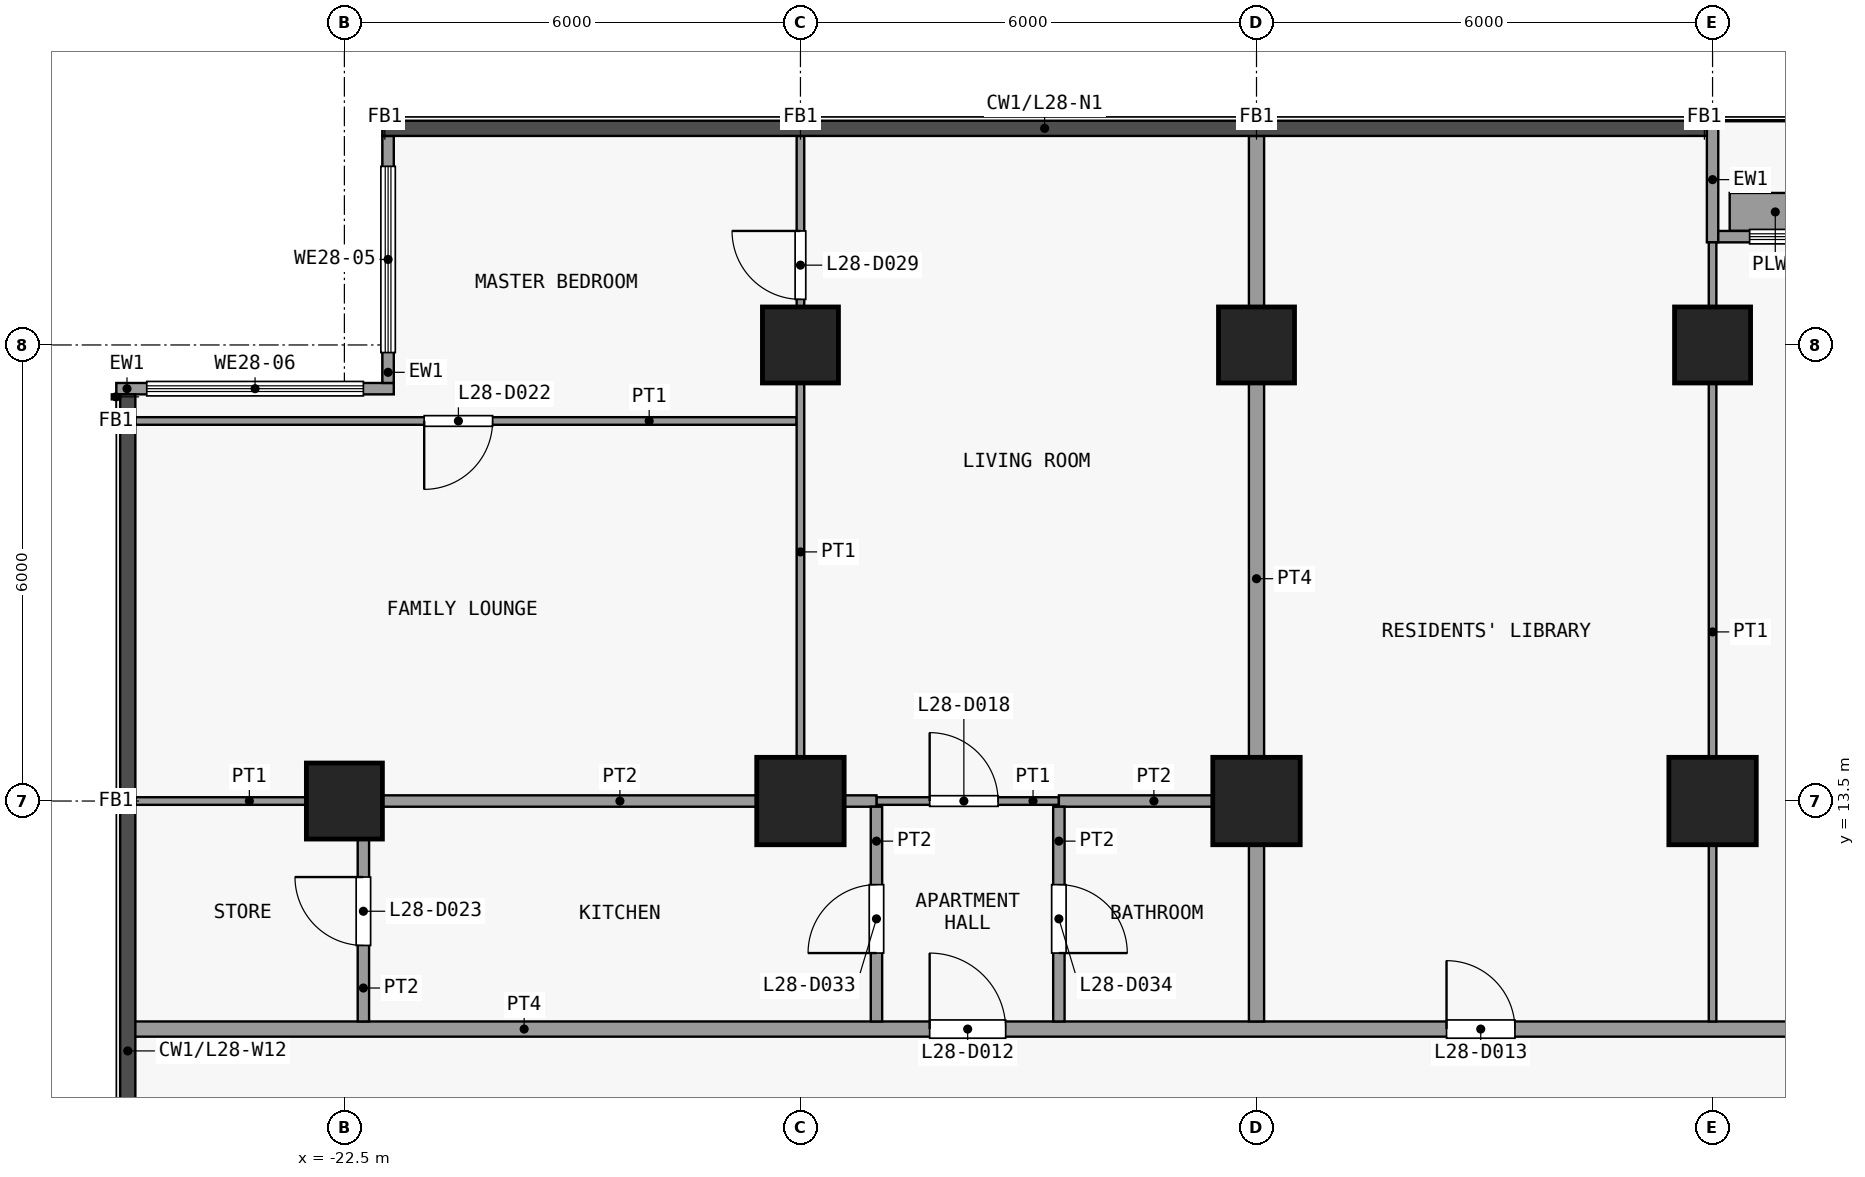
"""IFC4 building model, lengths in metres.
Left out: names, types, materials, properties, quantities, classifications, styles, units other than length and angle.
Written with IfcOpenShell. Run it as: python <this file> out.ifc"""

import sys

from ifc_helpers import new_model, si_unit, direction, frame, frame_2d, origin, origin_2d, place, context, subcontext, project, spatial, rectangle, extrude, element, fill, save


model = new_model("IFC4")
c1 = context("Model", 3, precision=1e-05, world=origin(), true_north=direction((0.0, 1.0)))
c2 = subcontext(c1, "Body", "Model", "MODEL_VIEW")
j1 = project(units=[si_unit("LENGTHUNIT", "METRE"), si_unit("PLANEANGLEUNIT", "RADIAN")], contexts=[c1])
p1 = place(None, origin())
s1 = spatial("IfcSite", under=j1, at=p1, CompositionType="ELEMENT")
p2 = place(p1, origin())
s2 = spatial("IfcBuilding", under=s1, at=p2, CompositionType="ELEMENT")
p3 = place(p2, frame((0.0, 0.0, 113.5)))
s3 = spatial("IfcBuildingStorey", under=s2, at=p3, CompositionType="ELEMENT", Elevation=113.5)
p4 = place(p3, frame((-22.5, 13.5, 0.0), z_axis=(0.0, 0.0, 1.0), x_axis=(1.0, 0.0, 0.0)))
e1 = element("IfcColumn", 1, at=p4, inside=s3, PredefinedType="COLUMN", context=c2, shape_type="SweptSolid", body=[
    extrude(rectangle(XDim=1.0, YDim=1.0, at=origin_2d()), origin(), (0.0, 0.0, 1.0), 3.6),
])
p5 = place(p3, frame((-16.5, 13.5, 0.0), z_axis=(0.0, 0.0, 1.0), x_axis=(1.0, 0.0, 0.0)))
e2 = element("IfcColumn", 2, at=p5, inside=s3, PredefinedType="COLUMN", context=c2, shape_type="SweptSolid", body=[
    extrude(rectangle(XDim=1.15, YDim=1.15, at=origin_2d()), origin(), (0.0, 0.0, 1.0), 3.6),
])
p6 = place(p3, frame((-16.5, 19.5, 0.0), z_axis=(0.0, 0.0, 1.0), x_axis=(1.0, 0.0, 0.0)))
e3 = element("IfcColumn", 3, at=p6, inside=s3, PredefinedType="COLUMN", context=c2, shape_type="SweptSolid", body=[
    extrude(rectangle(XDim=1.0, YDim=1.0, at=origin_2d()), origin(), (0.0, 0.0, 1.0), 3.6),
])
p7 = place(p3, frame((-10.5, 13.5, 0.0), z_axis=(0.0, 0.0, 1.0), x_axis=(1.0, 0.0, 0.0)))
e4 = element("IfcColumn", 4, at=p7, inside=s3, PredefinedType="COLUMN", context=c2, shape_type="SweptSolid", body=[
    extrude(rectangle(XDim=1.15, YDim=1.15, at=origin_2d()), origin(), (0.0, 0.0, 1.0), 3.6),
])
p8 = place(p3, frame((-10.5, 19.5, 0.0), z_axis=(0.0, 0.0, 1.0), x_axis=(1.0, 0.0, 0.0)))
e5 = element("IfcColumn", 5, at=p8, inside=s3, PredefinedType="COLUMN", context=c2, shape_type="SweptSolid", body=[
    extrude(rectangle(XDim=1.0, YDim=1.0, at=origin_2d()), origin(), (0.0, 0.0, 1.0), 3.6),
])
p9 = place(p3, frame((-4.5, 13.5, 0.0), z_axis=(0.0, 0.0, 1.0), x_axis=(1.0, 0.0, 0.0)))
e6 = element("IfcColumn", 6, at=p9, inside=s3, PredefinedType="COLUMN", context=c2, shape_type="SweptSolid", body=[
    extrude(rectangle(XDim=1.15, YDim=1.15, at=origin_2d()), origin(), (0.0, 0.0, 1.0), 3.6),
])
p10 = place(p3, frame((-4.5, 19.5, 0.0), z_axis=(0.0, 0.0, 1.0), x_axis=(1.0, 0.0, 0.0)))
e7 = element("IfcColumn", 7, at=p10, inside=s3, PredefinedType="COLUMN", context=c2, shape_type="SweptSolid", body=[
    extrude(rectangle(XDim=1.0, YDim=1.0, at=origin_2d()), origin(), (0.0, 0.0, 1.0), 3.6),
])
p11 = place(p3, frame((-21.925, 19.0, 0.0), z_axis=(0.0, 0.0, 1.0), x_axis=(0.0, 1.0, 0.0)))
e8 = element("IfcWall", 8, at=p11, inside=s3, PredefinedType="SOLIDWALL", context=c2, shape_type="SweptSolid", body=[
    extrude(rectangle(XDim=3.25, YDim=0.15, at=frame_2d((1.625, 0.0))), origin(), (0.0, 0.0, 1.0), 3.3),
])
p12 = place(p11, frame((0.4, 0.0, 0.9)))
e9 = element("IfcOpeningElement", 9, at=p12, cuts=e8, PredefinedType="OPENING", context=c2, shape_type="SweptSolid", body=[
    extrude(rectangle(XDim=2.45, YDim=2.4, at=frame_2d((1.225, 1.2))), frame((0.0, 0.085, 0.0), z_axis=(0.0, -1.0, 0.0), x_axis=(1.0, 0.0, 0.0)), (0.0, 0.0, 1.0), 0.17),
])
p13 = place(p3, frame((-25.5, 18.925, 0.0), z_axis=(0.0, 0.0, 1.0), x_axis=(1.0, 0.0, 0.0)))
e10 = element("IfcWall", 10, at=p13, inside=s3, PredefinedType="SOLIDWALL", context=c2, shape_type="SweptSolid", body=[
    extrude(rectangle(XDim=3.65, YDim=0.15, at=frame_2d((1.825, 0.0))), origin(), (0.0, 0.0, 1.0), 3.3),
])
p14 = place(p13, frame((0.4, 0.0, 0.9)))
e11 = element("IfcOpeningElement", 11, at=p14, cuts=e10, PredefinedType="OPENING", context=c2, shape_type="SweptSolid", body=[
    extrude(rectangle(XDim=2.85, YDim=2.4, at=frame_2d((1.425, 1.2))), frame((0.0, 0.085, 0.0), z_axis=(0.0, -1.0, 0.0), x_axis=(1.0, 0.0, 0.0)), (0.0, 0.0, 1.0), 0.17),
])
p15 = place(p3, frame((-4.5, 20.85, 0.0), z_axis=(0.0, 0.0, 1.0), x_axis=(0.0, 1.0, 0.0)))
e12 = element("IfcWall", 12, at=p15, inside=s3, PredefinedType="SOLIDWALL", context=c2, shape_type="SweptSolid", body=[
    extrude(rectangle(XDim=1.65, YDim=0.15, at=frame_2d((0.825, 0.0))), origin(), (0.0, 0.0, 1.0), 3.3),
])
p16 = place(p3, frame((-4.425, 20.925, 0.0), z_axis=(0.0, 0.0, 1.0), x_axis=(1.0, 0.0, 0.0)))
e13 = element("IfcWall", 13, at=p16, inside=s3, PredefinedType="SOLIDWALL", context=c2, shape_type="SweptSolid", body=[
    extrude(rectangle(XDim=8.85, YDim=0.15, at=frame_2d((4.425, 0.0))), origin(), (0.0, 0.0, 1.0), 3.3),
])
p17 = place(p16, frame((3.825, 0.0, 0.0)))
e14 = element("IfcOpeningElement", 14, at=p17, cuts=e13, PredefinedType="OPENING", context=c2, shape_type="SweptSolid", body=[
    extrude(rectangle(XDim=1.2, YDim=2.4, at=frame_2d((0.6, 1.2))), frame((0.0, 0.085, 0.0), z_axis=(0.0, -1.0, 0.0), x_axis=(1.0, 0.0, 0.0)), (0.0, 0.0, 1.0), 0.17),
])
p18 = place(p16, frame((0.413, 0.0, 0.9)))
e15 = element("IfcOpeningElement", 15, at=p18, cuts=e13, PredefinedType="OPENING", context=c2, shape_type="SweptSolid", body=[
    extrude(rectangle(XDim=3.0, YDim=2.1, at=frame_2d((1.5, 1.05))), frame((0.0, 0.085, 0.0), z_axis=(0.0, -1.0, 0.0), x_axis=(1.0, 0.0, 0.0)), (0.0, 0.0, 1.0), 0.17),
])
p19 = place(p16, frame((5.438, 0.0, 0.9)))
e16 = element("IfcOpeningElement", 16, at=p19, cuts=e13, PredefinedType="OPENING", context=c2, shape_type="SweptSolid", body=[
    extrude(rectangle(XDim=3.0, YDim=2.1, at=frame_2d((1.5, 1.05))), frame((0.0, 0.085, 0.0), z_axis=(0.0, -1.0, 0.0), x_axis=(1.0, 0.0, 0.0)), (0.0, 0.0, 1.0), 0.17),
])
p20 = place(p3, frame((-4.275, 21.25, 0.0), z_axis=(0.0, 0.0, 1.0), x_axis=(1.0, 0.0, 0.0)))
e17 = element("IfcWall", 17, at=p20, inside=s3, PredefinedType="USERDEFINED", context=c2, shape_type="SweptSolid", body=[
    extrude(rectangle(XDim=1.2, YDim=0.5, at=frame_2d((0.6, 0.0))), origin(), (0.0, 0.0, 1.0), 0.9),
])
p21 = place(p3, frame((-25.35, 10.5, 0.0), z_axis=(0.0, 0.0, 1.0), x_axis=(1.0, 0.0, 0.0)))
e18 = element("IfcWall", 18, at=p21, inside=s3, PredefinedType="PARTITIONING", context=c2, shape_type="SweptSolid", body=[
    extrude(rectangle(XDim=49.2, YDim=0.2, at=frame_2d((24.6, 0.0))), origin(), (0.0, 0.0, 1.0), 3.3),
])
p22 = place(p21, frame((10.55, 0.0, 0.0)))
e19 = element("IfcOpeningElement", 19, at=p22, cuts=e18, PredefinedType="OPENING", context=c2, shape_type="SweptSolid", body=[
    extrude(rectangle(XDim=1.0, YDim=2.1, at=frame_2d((0.5, 1.05))), frame((0.0, 0.11, 0.0), z_axis=(0.0, -1.0, 0.0), x_axis=(1.0, 0.0, 0.0)), (0.0, 0.0, 1.0), 0.22),
])
p23 = place(p21, frame((17.35, 0.0, 0.0)))
e20 = element("IfcOpeningElement", 20, at=p23, cuts=e18, PredefinedType="OPENING", context=c2, shape_type="SweptSolid", body=[
    extrude(rectangle(XDim=0.9, YDim=2.1, at=frame_2d((0.45, 1.05))), frame((0.0, 0.11, 0.0), z_axis=(0.0, -1.0, 0.0), x_axis=(1.0, 0.0, 0.0)), (0.0, 0.0, 1.0), 0.22),
])
p24 = place(p21, frame((24.85, 0.0, 0.0)))
e21 = element("IfcOpeningElement", 21, at=p24, cuts=e18, PredefinedType="OPENING", context=c2, shape_type="SweptSolid", body=[
    extrude(rectangle(XDim=0.9, YDim=2.1, at=frame_2d((0.45, 1.05))), frame((0.0, 0.11, 0.0), z_axis=(0.0, -1.0, 0.0), x_axis=(1.0, 0.0, 0.0)), (0.0, 0.0, 1.0), 0.22),
])
p25 = place(p21, frame((32.35, 0.0, 0.0)))
e22 = element("IfcOpeningElement", 22, at=p25, cuts=e18, PredefinedType="OPENING", context=c2, shape_type="SweptSolid", body=[
    extrude(rectangle(XDim=0.9, YDim=2.1, at=frame_2d((0.45, 1.05))), frame((0.0, 0.11, 0.0), z_axis=(0.0, -1.0, 0.0), x_axis=(1.0, 0.0, 0.0)), (0.0, 0.0, 1.0), 0.22),
])
p26 = place(p21, frame((36.55, 0.0, 0.0)))
e23 = element("IfcOpeningElement", 23, at=p26, cuts=e18, PredefinedType="OPENING", context=c2, shape_type="SweptSolid", body=[
    extrude(rectangle(XDim=1.0, YDim=2.1, at=frame_2d((0.5, 1.05))), frame((0.0, 0.11, 0.0), z_axis=(0.0, -1.0, 0.0), x_axis=(1.0, 0.0, 0.0)), (0.0, 0.0, 1.0), 0.22),
])
p27 = place(p21, frame((45.05, 0.0, 0.0)))
e24 = element("IfcOpeningElement", 24, at=p27, cuts=e18, PredefinedType="OPENING", context=c2, shape_type="SweptSolid", body=[
    extrude(rectangle(XDim=1.0, YDim=2.1, at=frame_2d((0.5, 1.05))), frame((0.0, 0.11, 0.0), z_axis=(0.0, -1.0, 0.0), x_axis=(1.0, 0.0, 0.0)), (0.0, 0.0, 1.0), 0.22),
])
p28 = place(p3, frame((-25.25, 13.5, 0.0), z_axis=(0.0, 0.0, 1.0), x_axis=(1.0, 0.0, 0.0)))
e25 = element("IfcWall", 25, at=p28, inside=s3, PredefinedType="PARTITIONING", context=c2, shape_type="SweptSolid", body=[
    extrude(rectangle(XDim=3.0, YDim=0.1, at=frame_2d((1.5, 0.0))), origin(), (0.0, 0.0, 1.0), 3.3),
])
p29 = place(p3, frame((-15.5, 13.5, 0.0), z_axis=(0.0, 0.0, 1.0), x_axis=(1.0, 0.0, 0.0)))
e26 = element("IfcWall", 26, at=p29, inside=s3, PredefinedType="PARTITIONING", context=c2, shape_type="SweptSolid", body=[
    extrude(rectangle(XDim=2.4, YDim=0.1, at=frame_2d((1.2, 0.0))), origin(), (0.0, 0.0, 1.0), 3.3),
])
p30 = place(p29, frame((0.7, 0.0, 0.0)))
e27 = element("IfcOpeningElement", 27, at=p30, cuts=e26, PredefinedType="OPENING", context=c2, shape_type="SweptSolid", body=[
    extrude(rectangle(XDim=0.9, YDim=2.1, at=frame_2d((0.45, 1.05))), frame((0.0, 0.06, 0.0), z_axis=(0.0, -1.0, 0.0), x_axis=(1.0, 0.0, 0.0)), (0.0, 0.0, 1.0), 0.12),
])
p31 = place(p3, frame((-22.25, 13.5, 0.0), z_axis=(0.0, 0.0, 1.0), x_axis=(1.0, 0.0, 0.0)))
e28 = element("IfcWall", 28, at=p31, inside=s3, PredefinedType="PARTITIONING", context=c2, shape_type="SweptSolid", body=[
    extrude(rectangle(XDim=6.75, YDim=0.15, at=frame_2d((3.375, 0.0))), origin(), (0.0, 0.0, 1.0), 3.3),
])
p32 = place(p3, frame((-13.1, 13.5, 0.0), z_axis=(0.0, 0.0, 1.0), x_axis=(1.0, 0.0, 0.0)))
e29 = element("IfcWall", 29, at=p32, inside=s3, PredefinedType="PARTITIONING", context=c2, shape_type="SweptSolid", body=[
    extrude(rectangle(XDim=2.5, YDim=0.15, at=frame_2d((1.25, 0.0))), origin(), (0.0, 0.0, 1.0), 3.3),
])
p33 = place(p3, frame((-25.25, 18.5, 0.0), z_axis=(0.0, 0.0, 1.0), x_axis=(1.0, 0.0, 0.0)))
e30 = element("IfcWall", 30, at=p33, inside=s3, PredefinedType="PARTITIONING", context=c2, shape_type="SweptSolid", body=[
    extrude(rectangle(XDim=8.7, YDim=0.1, at=frame_2d((4.35, 0.0))), origin(), (0.0, 0.0, 1.0), 3.3),
])
p34 = place(p33, frame((3.8, 0.0, 0.0)))
e31 = element("IfcOpeningElement", 31, at=p34, cuts=e30, PredefinedType="OPENING", context=c2, shape_type="SweptSolid", body=[
    extrude(rectangle(XDim=0.9, YDim=2.1, at=frame_2d((0.45, 1.05))), frame((0.0, 0.06, 0.0), z_axis=(0.0, -1.0, 0.0), x_axis=(1.0, 0.0, 0.0)), (0.0, 0.0, 1.0), 0.12),
])
p35 = place(p3, frame((-22.25, 10.6, 0.0), z_axis=(0.0, 0.0, 1.0), x_axis=(0.0, 1.0, 0.0)))
e32 = element("IfcWall", 32, at=p35, inside=s3, PredefinedType="PARTITIONING", context=c2, shape_type="SweptSolid", body=[
    extrude(rectangle(XDim=2.825, YDim=0.15, at=frame_2d((1.413, 0.0))), origin(), (0.0, 0.0, 1.0), 3.3),
])
p36 = place(p35, frame((1.0, 0.0, 0.0)))
e33 = element("IfcOpeningElement", 33, at=p36, cuts=e32, PredefinedType="OPENING", context=c2, shape_type="SweptSolid", body=[
    extrude(rectangle(XDim=0.9, YDim=2.1, at=frame_2d((0.45, 1.05))), frame((0.0, 0.085, 0.0), z_axis=(0.0, -1.0, 0.0), x_axis=(1.0, 0.0, 0.0)), (0.0, 0.0, 1.0), 0.17),
])
p37 = place(p3, frame((-16.5, 13.575, 0.0), z_axis=(0.0, 0.0, 1.0), x_axis=(0.0, 1.0, 0.0)))
e34 = element("IfcWall", 34, at=p37, inside=s3, PredefinedType="PARTITIONING", context=c2, shape_type="SweptSolid", body=[
    extrude(rectangle(XDim=8.675, YDim=0.1, at=frame_2d((4.337, 0.0))), origin(), (0.0, 0.0, 1.0), 3.3),
])
p38 = place(p37, frame((6.525, 0.0, 0.0)))
e35 = element("IfcOpeningElement", 35, at=p38, cuts=e34, PredefinedType="OPENING", context=c2, shape_type="SweptSolid", body=[
    extrude(rectangle(XDim=0.9, YDim=2.1, at=frame_2d((0.45, 1.05))), frame((0.0, 0.06, 0.0), z_axis=(0.0, -1.0, 0.0), x_axis=(1.0, 0.0, 0.0)), (0.0, 0.0, 1.0), 0.12),
])
p39 = place(p3, frame((-15.5, 10.6, 0.0), z_axis=(0.0, 0.0, 1.0), x_axis=(0.0, 1.0, 0.0)))
e36 = element("IfcWall", 36, at=p39, inside=s3, PredefinedType="PARTITIONING", context=c2, shape_type="SweptSolid", body=[
    extrude(rectangle(XDim=2.825, YDim=0.15, at=frame_2d((1.413, 0.0))), origin(), (0.0, 0.0, 1.0), 3.3),
])
p40 = place(p39, frame((0.9, 0.0, 0.0)))
e37 = element("IfcOpeningElement", 37, at=p40, cuts=e36, PredefinedType="OPENING", context=c2, shape_type="SweptSolid", body=[
    extrude(rectangle(XDim=0.9, YDim=2.1, at=frame_2d((0.45, 1.05))), frame((0.0, 0.085, 0.0), z_axis=(0.0, -1.0, 0.0), x_axis=(1.0, 0.0, 0.0)), (0.0, 0.0, 1.0), 0.17),
])
p41 = place(p3, frame((-13.1, 10.6, 0.0), z_axis=(0.0, 0.0, 1.0), x_axis=(0.0, 1.0, 0.0)))
e38 = element("IfcWall", 38, at=p41, inside=s3, PredefinedType="PARTITIONING", context=c2, shape_type="SweptSolid", body=[
    extrude(rectangle(XDim=2.825, YDim=0.15, at=frame_2d((1.413, 0.0))), origin(), (0.0, 0.0, 1.0), 3.3),
])
p42 = place(p41, frame((0.9, 0.0, 0.0)))
e39 = element("IfcOpeningElement", 39, at=p42, cuts=e38, PredefinedType="OPENING", context=c2, shape_type="SweptSolid", body=[
    extrude(rectangle(XDim=0.9, YDim=2.1, at=frame_2d((0.45, 1.05))), frame((0.0, 0.085, 0.0), z_axis=(0.0, -1.0, 0.0), x_axis=(1.0, 0.0, 0.0)), (0.0, 0.0, 1.0), 0.17),
])
p43 = place(p3, frame((-10.5, 10.6, 0.0), z_axis=(0.0, 0.0, 1.0), x_axis=(0.0, 1.0, 0.0)))
e40 = element("IfcWall", 40, at=p43, inside=s3, PredefinedType="PARTITIONING", context=c2, shape_type="SweptSolid", body=[
    extrude(rectangle(XDim=11.65, YDim=0.2, at=frame_2d((5.825, 0.0))), origin(), (0.0, 0.0, 1.0), 3.3),
])
p44 = place(p3, frame((-4.5, 10.6, 0.0), z_axis=(0.0, 0.0, 1.0), x_axis=(0.0, 1.0, 0.0)))
e41 = element("IfcWall", 41, at=p44, inside=s3, PredefinedType="PARTITIONING", context=c2, shape_type="SweptSolid", body=[
    extrude(rectangle(XDim=10.25, YDim=0.1, at=frame_2d((5.125, 0.0))), origin(), (0.0, 0.0, 1.0), 3.3),
])
p45 = place(p12, origin())
e42 = element("IfcWindow", 42, at=p45, inside=s3, PartitioningType="SINGLE_PANEL", PredefinedType="WINDOW", context=c2, shape_type="SweptSolid", body=[
    extrude(rectangle(XDim=2.45, YDim=2.4, at=frame_2d((1.225, 1.2))), frame((0.0, 0.03, 0.0), z_axis=(0.0, -1.0, 0.0), x_axis=(1.0, 0.0, 0.0)), (0.0, 0.0, 1.0), 0.06),
])
fill(e9, e42)
p46 = place(p14, origin())
e43 = element("IfcWindow", 43, at=p46, inside=s3, PartitioningType="SINGLE_PANEL", PredefinedType="WINDOW", context=c2, shape_type="SweptSolid", body=[
    extrude(rectangle(XDim=2.85, YDim=2.4, at=frame_2d((1.425, 1.2))), frame((0.0, 0.03, 0.0), z_axis=(0.0, -1.0, 0.0), x_axis=(1.0, 0.0, 0.0)), (0.0, 0.0, 1.0), 0.06),
])
fill(e11, e43)
p47 = place(p18, origin())
e44 = element("IfcWindow", 44, at=p47, inside=s3, PartitioningType="SINGLE_PANEL", PredefinedType="WINDOW", context=c2, shape_type="SweptSolid", body=[
    extrude(rectangle(XDim=3.0, YDim=2.1, at=frame_2d((1.5, 1.05))), frame((0.0, 0.03, 0.0), z_axis=(0.0, -1.0, 0.0), x_axis=(1.0, 0.0, 0.0)), (0.0, 0.0, 1.0), 0.06),
])
fill(e15, e44)
p48 = place(p22, origin())
e45 = element("IfcDoor", 45, at=p48, inside=s3, OperationType="SINGLE_SWING_RIGHT", PredefinedType="DOOR", context=c2, shape_type="SweptSolid", body=[
    extrude(rectangle(XDim=1.0, YDim=2.1, at=frame_2d((0.5, 1.05))), frame((0.0, 0.025, 0.0), z_axis=(0.0, -1.0, 0.0), x_axis=(1.0, 0.0, 0.0)), (0.0, 0.0, 1.0), 0.05),
])
fill(e19, e45)
p49 = place(p23, origin())
e46 = element("IfcDoor", 46, at=p49, inside=s3, OperationType="SINGLE_SWING_RIGHT", PredefinedType="DOOR", context=c2, shape_type="SweptSolid", body=[
    extrude(rectangle(XDim=0.9, YDim=2.1, at=frame_2d((0.45, 1.05))), frame((0.0, 0.025, 0.0), z_axis=(0.0, -1.0, 0.0), x_axis=(1.0, 0.0, 0.0)), (0.0, 0.0, 1.0), 0.05),
])
fill(e20, e46)
p50 = place(p30, origin())
e47 = element("IfcDoor", 47, at=p50, inside=s3, OperationType="SINGLE_SWING_RIGHT", PredefinedType="DOOR", context=c2, shape_type="SweptSolid", body=[
    extrude(rectangle(XDim=0.9, YDim=2.1, at=frame_2d((0.45, 1.05))), frame((0.0, 0.025, 0.0), z_axis=(0.0, -1.0, 0.0), x_axis=(1.0, 0.0, 0.0)), (0.0, 0.0, 1.0), 0.05),
])
fill(e27, e47)
p51 = place(p34, origin())
e48 = element("IfcDoor", 48, at=p51, inside=s3, OperationType="SINGLE_SWING_LEFT", PredefinedType="DOOR", context=c2, shape_type="SweptSolid", body=[
    extrude(rectangle(XDim=0.9, YDim=2.1, at=frame_2d((0.45, 1.05))), frame((0.0, 0.025, 0.0), z_axis=(0.0, -1.0, 0.0), x_axis=(1.0, 0.0, 0.0)), (0.0, 0.0, 1.0), 0.05),
])
fill(e31, e48)
p52 = place(p36, origin())
e49 = element("IfcDoor", 49, at=p52, inside=s3, OperationType="SINGLE_SWING_LEFT", PredefinedType="DOOR", context=c2, shape_type="SweptSolid", body=[
    extrude(rectangle(XDim=0.9, YDim=2.1, at=frame_2d((0.45, 1.05))), frame((0.0, 0.025, 0.0), z_axis=(0.0, -1.0, 0.0), x_axis=(1.0, 0.0, 0.0)), (0.0, 0.0, 1.0), 0.05),
])
fill(e33, e49)
p53 = place(p38, origin())
e50 = element("IfcDoor", 50, at=p53, inside=s3, OperationType="SINGLE_SWING_LEFT", PredefinedType="DOOR", context=c2, shape_type="SweptSolid", body=[
    extrude(rectangle(XDim=0.9, YDim=2.1, at=frame_2d((0.45, 1.05))), frame((0.0, 0.025, 0.0), z_axis=(0.0, -1.0, 0.0), x_axis=(1.0, 0.0, 0.0)), (0.0, 0.0, 1.0), 0.05),
])
fill(e35, e50)
p54 = place(p40, origin())
e51 = element("IfcDoor", 51, at=p54, inside=s3, OperationType="SINGLE_SWING_RIGHT", PredefinedType="DOOR", context=c2, shape_type="SweptSolid", body=[
    extrude(rectangle(XDim=0.9, YDim=2.1, at=frame_2d((0.45, 1.05))), frame((0.0, 0.025, 0.0), z_axis=(0.0, -1.0, 0.0), x_axis=(1.0, 0.0, 0.0)), (0.0, 0.0, 1.0), 0.05),
])
fill(e37, e51)
p55 = place(p42, origin())
e52 = element("IfcDoor", 52, at=p55, inside=s3, OperationType="SINGLE_SWING_LEFT", PredefinedType="DOOR", context=c2, shape_type="SweptSolid", body=[
    extrude(rectangle(XDim=0.9, YDim=2.1, at=frame_2d((0.45, 1.05))), frame((0.0, 0.025, 0.0), z_axis=(0.0, -1.0, 0.0), x_axis=(1.0, 0.0, 0.0)), (0.0, 0.0, 1.0), 0.05),
])
fill(e39, e52)
save(model, sys.argv[1])
